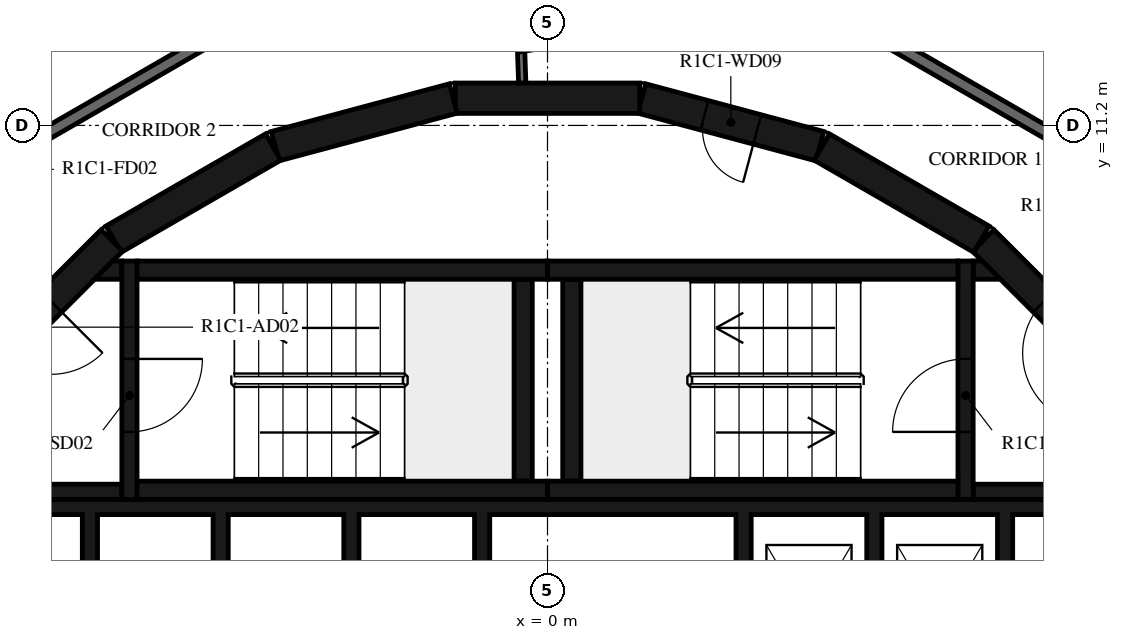
"""IFC4 building model, lengths in metres.
Left out: names, types, materials, properties, quantities, classifications, styles, units other than length and angle.
Written with IfcOpenShell. Run it as: python <this file> out.ifc"""

import sys

from ifc_helpers import new_model, si_unit, direction, frame, frame_2d, origin, place, context, subcontext, project, spatial, polyline, rectangle, outline, extrude, element, fill, save


model = new_model("IFC4")
c1 = context("Model", 3, precision=1e-05, world=origin(), true_north=direction((0.0, 1.0)))
c2 = subcontext(c1, "Body", "Model", "MODEL_VIEW")
j1 = project(units=[si_unit("LENGTHUNIT", "METRE"), si_unit("PLANEANGLEUNIT", "RADIAN")], contexts=[c1])
p1 = place(None, origin())
s1 = spatial("IfcSite", under=j1, at=p1, CompositionType="ELEMENT")
p2 = place(p1, origin())
s2 = spatial("IfcBuilding", under=s1, at=p2, CompositionType="ELEMENT")
p3 = place(p2, frame((0.0, 0.0, 62.9)))
s3 = spatial("IfcBuildingStorey", under=s2, at=p3, CompositionType="ELEMENT", Elevation=62.9)
p4 = place(p3, frame((9.308, 7.164, 0.0), z_axis=(0.0, 0.0, 1.0), x_axis=(-0.707106781187, 0.707106781187, 0.0)))
e1 = element("IfcWall", 1, at=p4, inside=s3, PredefinedType="SHEAR", context=c2, shape_type="SweptSolid", body=[
    extrude(rectangle(XDim=3.032, YDim=0.5, at=frame_2d((1.516, 0.0))), origin(), (0.0, 0.0, 1.0), 3.12),
])
p5 = place(p4, frame((0.416, 0.0, 0.0)))
e2 = element("IfcOpeningElement", 2, at=p5, cuts=e1, PredefinedType="OPENING", context=c2, shape_type="SweptSolid", body=[
    extrude(rectangle(XDim=1.2, YDim=2.1, at=frame_2d((0.6, 1.05))), frame((0.0, 0.26, 0.0), z_axis=(0.0, -1.0, 0.0), x_axis=(1.0, 0.0, 0.0)), (0.0, 0.0, 1.0), 0.52),
])
p6 = place(p3, frame((7.137, 9.329, 0.0), z_axis=(0.0, 0.0, 1.0), x_axis=(-0.865975092491, 0.500087131594, 0.0)))
e3 = element("IfcWall", 3, at=p6, inside=s3, PredefinedType="SHEAR", context=c2, shape_type="SweptSolid", body=[
    extrude(rectangle(XDim=3.033, YDim=0.5, at=frame_2d((1.516, 0.0))), origin(), (0.0, 0.0, 1.0), 3.12),
])
p7 = place(p3, frame((4.479, 10.858, 0.0), z_axis=(0.0, 0.0, 1.0), x_axis=(-0.965948410781, 0.258734743916, 0.0)))
e4 = element("IfcWall", 4, at=p7, inside=s3, PredefinedType="SHEAR", context=c2, shape_type="SweptSolid", body=[
    extrude(rectangle(XDim=3.033, YDim=0.5, at=frame_2d((1.516, 0.0))), origin(), (0.0, 0.0, 1.0), 3.12),
])
p8 = place(p7, frame((1.066, 0.0, 0.0)))
e5 = element("IfcOpeningElement", 5, at=p8, cuts=e4, PredefinedType="OPENING", context=c2, shape_type="SweptSolid", body=[
    extrude(rectangle(XDim=0.9, YDim=2.1, at=frame_2d((0.45, 1.05))), frame((0.0, 0.26, 0.0), z_axis=(0.0, -1.0, 0.0), x_axis=(1.0, 0.0, 0.0)), (0.0, 0.0, 1.0), 0.52),
])
for number, where, z_axis, x_axis in (
    (6, (1.516, 11.647, 0.0), (0.0, 0.0, 1.0), (-1.0, 0.0, 0.0)),
    (7, (-1.55, 11.643, 0.0), (0.0, 0.0, 1.0), (-0.966, -0.259, 0.0)),
    (8, (-4.51, 10.845, 0.0), (0.0, 0.0, 1.0), (-0.866, -0.5, 0.0)),
):
    element("IfcWall", number, at=place(p3, frame(where, z_axis=z_axis, x_axis=x_axis)), inside=s3, PredefinedType="SHEAR", context=c2, shape_type="SweptSolid", body=[
        extrude(rectangle(XDim=3.033, YDim=0.5, at=frame_2d((1.516, 0.0))), origin(), (0.0, 0.0, 1.0), 3.12),
    ])
p9 = place(p3, frame((-7.164, 9.308, 0.0), z_axis=(0.0, 0.0, 1.0), x_axis=(-0.707106781187, -0.707106781187, 0.0)))
e9 = element("IfcWall", 9, at=p9, inside=s3, PredefinedType="SHEAR", context=c2, shape_type="SweptSolid", body=[
    extrude(rectangle(XDim=3.032, YDim=0.5, at=frame_2d((1.516, 0.0))), origin(), (0.0, 0.0, 1.0), 3.12),
])
p10 = place(p9, frame((1.416, 0.0, 0.0)))
e10 = element("IfcOpeningElement", 10, at=p10, cuts=e9, PredefinedType="OPENING", context=c2, shape_type="SweptSolid", body=[
    extrude(rectangle(XDim=1.2, YDim=2.1, at=frame_2d((0.6, 1.05))), frame((0.0, 0.26, 0.0), z_axis=(0.0, -1.0, 0.0), x_axis=(1.0, 0.0, 0.0)), (0.0, 0.0, 1.0), 0.52),
])
for number, where, z_axis, x_axis in (
    (11, (0.0, 5.2, 0.0), (0.0, 0.0, 1.0), (1.0, 0.0, 0.0)),
    (12, (0.0, 8.82, 0.0), (0.0, 0.0, 1.0), (1.0, 0.0, 0.0)),
):
    element("IfcWall", number, at=place(p3, frame(where, z_axis=z_axis, x_axis=x_axis)), inside=s3, PredefinedType="SHEAR", context=c2, shape_type="SweptSolid", body=[
        extrude(rectangle(XDim=6.75, YDim=0.3, at=frame_2d((3.375, 0.0))), origin(), (0.0, 0.0, 1.0), 3.12),
    ])
p11 = place(p3, frame((0.4, 5.35, 0.0), z_axis=(0.0, 0.0, 1.0), x_axis=(0.0, 1.0, 0.0)))
e13 = element("IfcWall", 13, at=p11, inside=s3, PredefinedType="SHEAR", context=c2, shape_type="SweptSolid", body=[
    extrude(rectangle(XDim=3.32, YDim=0.3, at=frame_2d((1.66, 0.0))), origin(), (0.0, 0.0, 1.0), 3.12),
])
p12 = place(p3, frame((6.875, 5.05, 0.0), z_axis=(0.0, 0.0, 1.0), x_axis=(0.0, 1.0, 0.0)))
e14 = element("IfcWall", 14, at=p12, inside=s3, PredefinedType="SHEAR", context=c2, shape_type="SweptSolid", body=[
    extrude(rectangle(XDim=3.92, YDim=0.25, at=frame_2d((1.96, 0.0))), origin(), (0.0, 0.0, 1.0), 3.12),
])
p13 = place(p12, frame((1.11, 0.0, 0.0)))
e15 = element("IfcOpeningElement", 15, at=p13, cuts=e14, PredefinedType="OPENING", context=c2, shape_type="SweptSolid", body=[
    extrude(rectangle(XDim=1.2, YDim=2.1, at=frame_2d((0.6, 1.05))), frame((0.0, 0.135, 0.0), z_axis=(0.0, -1.0, 0.0), x_axis=(1.0, 0.0, 0.0)), (0.0, 0.0, 1.0), 0.27),
])
p14 = place(p3, frame((7.0, 5.175, 0.0), z_axis=(0.0, 0.0, 1.0), x_axis=(1.0, 0.0, 0.0)))
e16 = element("IfcWall", 16, at=p14, inside=s3, PredefinedType="SHEAR", context=c2, shape_type="SweptSolid", body=[
    extrude(rectangle(XDim=3.1, YDim=0.25, at=frame_2d((1.55, 0.0))), origin(), (0.0, 0.0, 1.0), 3.12),
])
p15 = place(p3, origin())
e17 = element("IfcWall", 17, at=p15, inside=s3, PredefinedType="SHEAR", context=c2, shape_type="SweptSolid", body=[
    extrude(outline(polyline([(7.448, 8.67), (7.0, 8.67), (7.0, 8.97), (7.148, 8.97), (7.448, 8.67)])), origin(), (0.0, 0.0, 1.0), 3.12),
])
for number, where, z_axis, x_axis in (
    (18, (-6.75, 5.2, 0.0), (0.0, 0.0, 1.0), (1.0, 0.0, 0.0)),
    (19, (-6.75, 8.82, 0.0), (0.0, 0.0, 1.0), (1.0, 0.0, 0.0)),
):
    element("IfcWall", number, at=place(p3, frame(where, z_axis=z_axis, x_axis=x_axis)), inside=s3, PredefinedType="SHEAR", context=c2, shape_type="SweptSolid", body=[
        extrude(rectangle(XDim=6.75, YDim=0.3, at=frame_2d((3.375, 0.0))), origin(), (0.0, 0.0, 1.0), 3.12),
    ])
p16 = place(p3, frame((-0.4, 5.35, 0.0), z_axis=(0.0, 0.0, 1.0), x_axis=(0.0, 1.0, 0.0)))
e20 = element("IfcWall", 20, at=p16, inside=s3, PredefinedType="SHEAR", context=c2, shape_type="SweptSolid", body=[
    extrude(rectangle(XDim=3.32, YDim=0.3, at=frame_2d((1.66, 0.0))), origin(), (0.0, 0.0, 1.0), 3.12),
])
p17 = place(p3, frame((-6.875, 8.97, 0.0), z_axis=(0.0, 0.0, 1.0), x_axis=(0.0, -1.0, 0.0)))
e21 = element("IfcWall", 21, at=p17, inside=s3, PredefinedType="SHEAR", context=c2, shape_type="SweptSolid", body=[
    extrude(rectangle(XDim=3.92, YDim=0.25, at=frame_2d((1.96, 0.0))), origin(), (0.0, 0.0, 1.0), 3.12),
])
p18 = place(p17, frame((1.61, 0.0, 0.0)))
e22 = element("IfcOpeningElement", 22, at=p18, cuts=e21, PredefinedType="OPENING", context=c2, shape_type="SweptSolid", body=[
    extrude(rectangle(XDim=1.2, YDim=2.1, at=frame_2d((0.6, 1.05))), frame((0.0, 0.135, 0.0), z_axis=(0.0, -1.0, 0.0), x_axis=(1.0, 0.0, 0.0)), (0.0, 0.0, 1.0), 0.27),
])
p19 = place(p3, frame((-7.0, 5.175, 0.0), z_axis=(0.0, 0.0, 1.0), x_axis=(-1.0, 0.0, 0.0)))
e23 = element("IfcWall", 23, at=p19, inside=s3, PredefinedType="SHEAR", context=c2, shape_type="SweptSolid", body=[
    extrude(rectangle(XDim=3.1, YDim=0.25, at=frame_2d((1.55, 0.0))), origin(), (0.0, 0.0, 1.0), 3.12),
])
p20 = place(p3, origin())
e24 = element("IfcWall", 24, at=p20, inside=s3, PredefinedType="SHEAR", context=c2, shape_type="SweptSolid", body=[
    extrude(outline(polyline([(-7.148, 8.97), (-7.0, 8.97), (-7.0, 8.67), (-7.448, 8.67), (-7.148, 8.97)])), origin(), (0.0, 0.0, 1.0), 3.12),
])
p21 = place(p3, origin())
e25 = element("IfcWall", 25, at=p21, inside=s3, PredefinedType="SHEAR", context=c2, shape_type="SweptSolid", body=[
    extrude(outline(polyline([(-9.55, 4.8), (-7.65, 4.8), (-7.65, 1.9), (-7.4, 1.9), (-7.4, 4.8), (-5.5, 4.8), (-5.5, 1.9), (-5.25, 1.9), (-5.25, 4.8), (-3.35, 4.8), (-3.35, 1.9), (-3.1, 1.9), (-3.1, 4.8), (-1.2, 4.8), (-1.2, 1.9), (-0.95, 1.9), (-0.95, 4.8), (3.1, 4.8), (3.1, 1.9), (3.35, 1.9), (3.35, 4.8), (5.25, 4.8), (5.25, 1.9), (5.5, 1.9), (5.5, 4.8), (7.4, 4.8), (7.4, 1.9), (7.65, 1.9), (7.65, 4.8), (9.55, 4.8), (9.55, 1.9), (9.8, 1.9), (9.8, 4.8), (9.8, 5.05), (-9.8, 5.05), (-9.8, 4.8), (-9.8, 1.9), (-9.55, 1.9), (-9.55, 4.8)])), origin(), (0.0, 0.0, 1.0), 3.12),
])
p22 = place(p3, frame((-0.479, 13.7, 0.0), z_axis=(0.0, 0.0, 1.0), x_axis=(0.034919103017, -0.999390142159, 0.0)))
e26 = element("IfcWall", 26, at=p22, inside=s3, PredefinedType="PARTITIONING", context=c2, shape_type="SweptSolid", body=[
    extrude(rectangle(XDim=1.804, YDim=0.12, at=frame_2d((0.902, 0.0))), origin(), (0.0, 0.0, 1.0), 3.12),
])
p23 = place(p22, frame((0.11, 0.0, 0.0)))
e27 = element("IfcOpeningElement", 27, at=p23, cuts=e26, PredefinedType="OPENING", context=c2, shape_type="SweptSolid", body=[
    extrude(rectangle(XDim=1.2, YDim=2.1, at=frame_2d((0.6, 1.05))), frame((0.0, 0.07, 0.0), z_axis=(0.0, -1.0, 0.0), x_axis=(1.0, 0.0, 0.0)), (0.0, 0.0, 1.0), 0.14),
])
p24 = place(p3, frame((10.029, 10.029, 0.0), z_axis=(0.0, 0.0, 1.0), x_axis=(-0.866024439905, 0.500001669485, 0.0)))
e28 = element("IfcWall", 28, at=p24, inside=s3, PredefinedType="STANDARD", context=c2, shape_type="SweptSolid", body=[
    extrude(rectangle(XDim=7.342, YDim=0.2, at=frame_2d((3.671, 0.0))), origin(), (0.0, 0.0, 1.0), 3.12),
])
p25 = place(p3, frame((-3.671, 13.7, 0.0), z_axis=(0.0, 0.0, 1.0), x_axis=(-0.866031419417, -0.499989580474, 0.0)))
e29 = element("IfcWall", 29, at=p25, inside=s3, PredefinedType="STANDARD", context=c2, shape_type="SweptSolid", body=[
    extrude(rectangle(XDim=7.147, YDim=0.2, at=frame_2d((3.573, 0.0))), origin(), (0.0, 0.0, 1.0), 3.12),
])
p26 = place(p25, frame((5.947, 0.0, 0.0)))
e30 = element("IfcOpeningElement", 30, at=p26, cuts=e29, PredefinedType="OPENING", context=c2, shape_type="SweptSolid", body=[
    extrude(rectangle(XDim=1.0, YDim=2.1, at=frame_2d((0.5, 1.05))), frame((0.0, 0.11, 0.0), z_axis=(0.0, -1.0, 0.0), x_axis=(1.0, 0.0, 0.0)), (0.0, 0.0, 1.0), 0.22),
])
p27 = place(p3, frame((11.127, 11.127, 0.0), z_axis=(0.0, 0.0, 1.0), x_axis=(-0.86602299963, 0.500004164094, 0.0)))
e31 = element("IfcWall", 31, at=p27, inside=s3, PredefinedType="PARTITIONING", context=c2, shape_type="SweptSolid", body=[
    extrude(rectangle(XDim=7.052, YDim=0.12, at=frame_2d((3.526, 0.0))), origin(), (0.0, 0.0, 1.0), 3.12),
])
p28 = place(p27, frame((1.4, 0.0, 0.0)))
e32 = element("IfcOpeningElement", 32, at=p28, cuts=e31, PredefinedType="OPENING", context=c2, shape_type="SweptSolid", body=[
    extrude(rectangle(XDim=0.8, YDim=2.1, at=frame_2d((0.4, 1.05))), frame((0.0, 0.07, 0.0), z_axis=(0.0, -1.0, 0.0), x_axis=(1.0, 0.0, 0.0)), (0.0, 0.0, 1.0), 0.14),
])
p29 = place(p13, origin())
e33 = element("IfcDoor", 33, at=p29, inside=s3, OperationType="SINGLE_SWING_LEFT", PredefinedType="DOOR", context=c2, shape_type="SweptSolid", body=[
    extrude(rectangle(XDim=1.2, YDim=2.1, at=frame_2d((0.6, 1.05))), frame((0.0, 0.025, 0.0), z_axis=(0.0, -1.0, 0.0), x_axis=(1.0, 0.0, 0.0)), (0.0, 0.0, 1.0), 0.05),
])
fill(e15, e33)
p30 = place(p5, origin())
e34 = element("IfcDoor", 34, at=p30, inside=s3, OperationType="SINGLE_SWING_RIGHT", PredefinedType="DOOR", context=c2, shape_type="SweptSolid", body=[
    extrude(rectangle(XDim=1.2, YDim=2.1, at=frame_2d((0.6, 1.05))), frame((0.0, 0.025, 0.0), z_axis=(0.0, -1.0, 0.0), x_axis=(1.0, 0.0, 0.0)), (0.0, 0.0, 1.0), 0.05),
])
fill(e2, e34)
p31 = place(p18, origin())
e35 = element("IfcDoor", 35, at=p31, inside=s3, OperationType="SINGLE_SWING_LEFT", PredefinedType="DOOR", context=c2, shape_type="SweptSolid", body=[
    extrude(rectangle(XDim=1.2, YDim=2.1, at=frame_2d((0.6, 1.05))), frame((0.0, 0.025, 0.0), z_axis=(0.0, -1.0, 0.0), x_axis=(1.0, 0.0, 0.0)), (0.0, 0.0, 1.0), 0.05),
])
fill(e22, e35)
p32 = place(p10, origin())
e36 = element("IfcDoor", 36, at=p32, inside=s3, OperationType="SINGLE_SWING_RIGHT", PredefinedType="DOOR", context=c2, shape_type="SweptSolid", body=[
    extrude(rectangle(XDim=1.2, YDim=2.1, at=frame_2d((0.6, 1.05))), frame((0.0, 0.025, 0.0), z_axis=(0.0, -1.0, 0.0), x_axis=(1.0, 0.0, 0.0)), (0.0, 0.0, 1.0), 0.05),
])
fill(e10, e36)
p33 = place(p8, origin())
e37 = element("IfcDoor", 37, at=p33, inside=s3, OperationType="SINGLE_SWING_RIGHT", PredefinedType="DOOR", context=c2, shape_type="SweptSolid", body=[
    extrude(rectangle(XDim=0.9, YDim=2.1, at=frame_2d((0.45, 1.05))), frame((0.0, 0.025, 0.0), z_axis=(0.0, -1.0, 0.0), x_axis=(1.0, 0.0, 0.0)), (0.0, 0.0, 1.0), 0.05),
])
fill(e5, e37)
p34 = place(p23, origin())
e38 = element("IfcDoor", 38, at=p34, inside=s3, OperationType="DOUBLE_DOOR_SINGLE_SWING", PredefinedType="DOOR", context=c2, shape_type="SweptSolid", body=[
    extrude(rectangle(XDim=1.2, YDim=2.1, at=frame_2d((0.6, 1.05))), frame((0.0, 0.025, 0.0), z_axis=(0.0, -1.0, 0.0), x_axis=(1.0, 0.0, 0.0)), (0.0, 0.0, 1.0), 0.05),
])
fill(e27, e38)
save(model, sys.argv[1])
